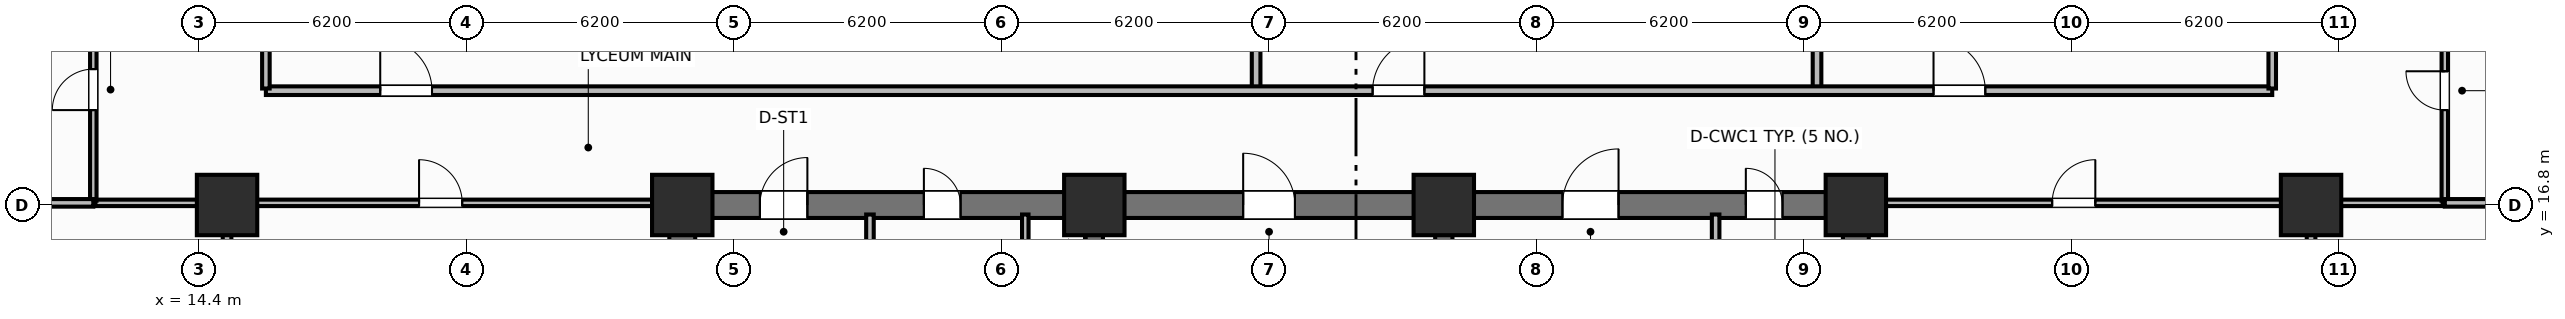
"""IFC4 building model, lengths in metres.
Left out: names, types, materials, properties, quantities, classifications, styles, units other than length and angle.
Written with IfcOpenShell. Run it as: python <this file> out.ifc"""

import sys

from ifc_helpers import new_model, si_unit, direction, frame, frame_2d, origin, origin_2d, place, context, subcontext, project, spatial, rectangle, extrude, element, fill, save


model = new_model("IFC4")
c1 = context("Model", 3, precision=1e-05, world=origin(), true_north=direction((0.0, 1.0)))
c2 = subcontext(c1, "Body", "Model", "MODEL_VIEW")
j1 = project(units=[si_unit("LENGTHUNIT", "METRE"), si_unit("PLANEANGLEUNIT", "RADIAN")], contexts=[c1])
p1 = place(None, origin())
s1 = spatial("IfcSite", under=j1, at=p1, CompositionType="ELEMENT")
p2 = place(p1, origin())
s2 = spatial("IfcBuilding", under=s1, at=p2, CompositionType="ELEMENT")
p3 = place(p2, frame((0.0, 0.0, 20.1)))
s3 = spatial("IfcBuildingStorey", under=s2, at=p3, CompositionType="ELEMENT", Elevation=20.1)
for number, where, z_axis, x_axis in (
    (1, (25.6, 10.9, 0.0), (0.0, 0.0, 1.0), (0.0, 1.0, 0.0)),
    (2, (52.8, 10.9, 0.0), (0.0, 0.0, 1.0), (0.0, 1.0, 0.0)),
):
    element("IfcWall", number, at=place(p3, frame(where, z_axis=z_axis, x_axis=x_axis)), inside=s3, PredefinedType="SHEAR", context=c2, shape_type="SweptSolid", body=[
        extrude(rectangle(XDim=5.6, YDim=0.6, at=frame_2d((2.8, 0.0))), origin(), (0.0, 0.0, 1.0), 4.5),
    ])
p4 = place(p3, frame((25.6, 16.8, 0.0), z_axis=(0.0, 0.0, 1.0), x_axis=(1.0, 0.0, 0.0)))
e3 = element("IfcWall", 3, at=p4, inside=s3, PredefinedType="SHEAR", context=c2, shape_type="SweptSolid", body=[
    extrude(rectangle(XDim=27.2, YDim=0.6, at=frame_2d((13.6, 0.0))), origin(), (0.0, 0.0, 1.0), 4.5),
])
p5 = place(p4, frame((1.8, 0.0, 0.0)))
e4 = element("IfcOpeningElement", 4, at=p5, cuts=e3, PredefinedType="OPENING", context=c2, shape_type="SweptSolid", body=[
    extrude(rectangle(XDim=1.1, YDim=2.15, at=frame_2d((0.55, 1.075))), frame((0.0, 0.31, 0.0), z_axis=(0.0, -1.0, 0.0), x_axis=(1.0, 0.0, 0.0)), (0.0, 0.0, 1.0), 0.62),
])
p6 = place(p4, frame((5.6, 0.0, 0.0)))
e5 = element("IfcOpeningElement", 5, at=p6, cuts=e3, PredefinedType="OPENING", context=c2, shape_type="SweptSolid", body=[
    extrude(rectangle(XDim=0.85, YDim=2.1, at=frame_2d((0.425, 1.05))), frame((0.0, 0.31, 0.0), z_axis=(0.0, -1.0, 0.0), x_axis=(1.0, 0.0, 0.0)), (0.0, 0.0, 1.0), 0.62),
])
p7 = place(p4, frame((13.0, 0.0, 0.0)))
e6 = element("IfcOpeningElement", 6, at=p7, cuts=e3, PredefinedType="OPENING", context=c2, shape_type="SweptSolid", body=[
    extrude(rectangle(XDim=1.2, YDim=2.15, at=frame_2d((0.6, 1.075))), frame((0.0, 0.31, 0.0), z_axis=(0.0, -1.0, 0.0), x_axis=(1.0, 0.0, 0.0)), (0.0, 0.0, 1.0), 0.62),
])
p8 = place(p4, frame((20.4, 0.0, 0.0)))
e7 = element("IfcOpeningElement", 7, at=p8, cuts=e3, PredefinedType="OPENING", context=c2, shape_type="SweptSolid", body=[
    extrude(rectangle(XDim=1.3, YDim=2.2, at=frame_2d((0.65, 1.1))), frame((0.0, 0.31, 0.0), z_axis=(0.0, -1.0, 0.0), x_axis=(1.0, 0.0, 0.0)), (0.0, 0.0, 1.0), 0.62),
])
p9 = place(p4, frame((24.65, 0.0, 0.0)))
e8 = element("IfcOpeningElement", 8, at=p9, cuts=e3, PredefinedType="OPENING", context=c2, shape_type="SweptSolid", body=[
    extrude(rectangle(XDim=0.85, YDim=2.1, at=frame_2d((0.425, 1.05))), frame((0.0, 0.31, 0.0), z_axis=(0.0, -1.0, 0.0), x_axis=(1.0, 0.0, 0.0)), (0.0, 0.0, 1.0), 0.62),
])
for number, where, z_axis, x_axis in (
    (9, (35.15, 10.9, 0.0), (0.0, 0.0, 1.0), (0.0, 1.0, 0.0)),
    (10, (43.25, 10.9, 0.0), (0.0, 0.0, 1.0), (0.0, 1.0, 0.0)),
):
    element("IfcWall", number, at=place(p3, frame(where, z_axis=z_axis, x_axis=x_axis)), inside=s3, PredefinedType="SHEAR", context=c2, shape_type="SweptSolid", body=[
        extrude(rectangle(XDim=5.6, YDim=0.4, at=frame_2d((2.8, 0.0))), origin(), (0.0, 0.0, 1.0), 4.5),
    ])
for number, where, z_axis, x_axis in (
    (11, (25.6, 16.8, 0.0), (0.0, 0.0, 1.0), (1.0, 0.0, 0.0)),
    (12, (35.15, 16.8, 0.0), (0.0, 0.0, 1.0), (1.0, 0.0, 0.0)),
    (13, (43.25, 16.8, 0.0), (0.0, 0.0, 1.0), (1.0, 0.0, 0.0)),
    (14, (52.8, 16.8, 0.0), (0.0, 0.0, 1.0), (1.0, 0.0, 0.0)),
    (15, (15.05, 16.8, 0.0), (0.0, 0.0, 1.0), (1.0, 0.0, 0.0)),
    (16, (63.35, 16.8, 0.0), (0.0, 0.0, 1.0), (1.0, 0.0, 0.0)),
):
    element("IfcColumn", number, at=place(p3, frame(where, z_axis=z_axis, x_axis=x_axis)), inside=s3, PredefinedType="COLUMN", context=c2, shape_type="SweptSolid", body=[
        extrude(rectangle(XDim=1.4, YDim=1.4, at=origin_2d()), origin(), (0.0, 0.0, 1.0), 4.5),
    ])
p10 = place(p3, frame((29.95, 14.5, 0.0), z_axis=(0.0, 0.0, 1.0), x_axis=(0.0, 1.0, 0.0)))
e17 = element("IfcWall", 17, at=p10, inside=s3, PredefinedType="PARTITIONING", context=c2, shape_type="SweptSolid", body=[
    extrude(rectangle(XDim=2.08, YDim=0.175, at=frame_2d((1.04, 0.0))), origin(), (0.0, 0.0, 1.0), 2.26),
])
p11 = place(p3, frame((33.55, 14.5, 0.0), z_axis=(0.0, 0.0, 1.0), x_axis=(0.0, 1.0, 0.0)))
e18 = element("IfcWall", 18, at=p11, inside=s3, PredefinedType="PARTITIONING", context=c2, shape_type="SweptSolid", body=[
    extrude(rectangle(XDim=2.08, YDim=0.15, at=frame_2d((1.04, 0.0))), origin(), (0.0, 0.0, 1.0), 2.26),
])
p12 = place(p11, frame((0.55, 0.0, 0.0)))
e19 = element("IfcOpeningElement", 19, at=p12, cuts=e18, PredefinedType="OPENING", context=c2, shape_type="SweptSolid", body=[
    extrude(rectangle(XDim=0.85, YDim=2.05, at=frame_2d((0.425, 1.025))), frame((0.0, 0.085, 0.0), z_axis=(0.0, -1.0, 0.0), x_axis=(1.0, 0.0, 0.0)), (0.0, 0.0, 1.0), 0.17),
])
p13 = place(p3, frame((49.55, 13.7, 0.0), z_axis=(0.0, 0.0, 1.0), x_axis=(0.0, 1.0, 0.0)))
e20 = element("IfcWall", 20, at=p13, inside=s3, PredefinedType="PARTITIONING", context=c2, shape_type="SweptSolid", body=[
    extrude(rectangle(XDim=2.88, YDim=0.175, at=frame_2d((1.44, 0.0))), origin(), (0.0, 0.0, 1.0), 2.26),
])
for number, where, z_axis, x_axis in (
    (21, (38.9, 19.5, 0.0), (0.0, 0.0, 1.0), (0.0, 1.0, 0.0)),
    (22, (51.9, 19.5, 0.0), (0.0, 0.0, 1.0), (0.0, 1.0, 0.0)),
):
    element("IfcWall", number, at=place(p3, frame(where, z_axis=z_axis, x_axis=x_axis)), inside=s3, PredefinedType="PARTITIONING", context=c2, shape_type="SweptSolid", body=[
        extrude(rectangle(XDim=17.4, YDim=0.2, at=frame_2d((8.7, 0.0))), origin(), (0.0, 0.0, 1.0), 2.26),
    ])
p14 = place(p3, frame((15.95, 19.45, 0.0), z_axis=(0.0, 0.0, 1.0), x_axis=(1.0, 0.0, 0.0)))
e23 = element("IfcWall", 23, at=p14, inside=s3, PredefinedType="PARTITIONING", context=c2, shape_type="SweptSolid", body=[
    extrude(rectangle(XDim=46.5, YDim=0.2, at=frame_2d((23.25, 0.0))), origin(), (0.0, 0.0, 1.0), 2.26),
])
p15 = place(p14, frame((2.65, 0.0, 0.0)))
e24 = element("IfcOpeningElement", 24, at=p15, cuts=e23, PredefinedType="OPENING", context=c2, shape_type="SweptSolid", body=[
    extrude(rectangle(XDim=1.2, YDim=2.15, at=frame_2d((0.6, 1.075))), frame((0.0, 0.11, 0.0), z_axis=(0.0, -1.0, 0.0), x_axis=(1.0, 0.0, 0.0)), (0.0, 0.0, 1.0), 0.22),
])
p16 = place(p14, frame((25.65, 0.0, 0.0)))
e25 = element("IfcOpeningElement", 25, at=p16, cuts=e23, PredefinedType="OPENING", context=c2, shape_type="SweptSolid", body=[
    extrude(rectangle(XDim=1.2, YDim=2.15, at=frame_2d((0.6, 1.075))), frame((0.0, 0.11, 0.0), z_axis=(0.0, -1.0, 0.0), x_axis=(1.0, 0.0, 0.0)), (0.0, 0.0, 1.0), 0.22),
])
p17 = place(p14, frame((38.65, 0.0, 0.0)))
e26 = element("IfcOpeningElement", 26, at=p17, cuts=e23, PredefinedType="OPENING", context=c2, shape_type="SweptSolid", body=[
    extrude(rectangle(XDim=1.2, YDim=2.15, at=frame_2d((0.6, 1.075))), frame((0.0, 0.11, 0.0), z_axis=(0.0, -1.0, 0.0), x_axis=(1.0, 0.0, 0.0)), (0.0, 0.0, 1.0), 0.22),
])
for number, where, z_axis, x_axis in (
    (27, (15.95, 19.5, 0.0), (0.0, 0.0, 1.0), (0.0, 1.0, 0.0)),
    (28, (62.45, 19.5, 0.0), (0.0, 0.0, 1.0), (0.0, 1.0, 0.0)),
):
    element("IfcWall", number, at=place(p3, frame(where, z_axis=z_axis, x_axis=x_axis)), inside=s3, PredefinedType="PARTITIONING", context=c2, shape_type="SweptSolid", body=[
        extrude(rectangle(XDim=17.4, YDim=0.175, at=frame_2d((8.7, 0.0))), origin(), (0.0, 0.0, 1.0), 2.26),
    ])
p18 = place(p3, frame((15.05, 0.4, 0.0), z_axis=(0.0, 0.0, 1.0), x_axis=(0.0, 1.0, 0.0)))
e29 = element("IfcWall", 29, at=p18, inside=s3, PredefinedType="PARTITIONING", context=c2, shape_type="SweptSolid", body=[
    extrude(rectangle(XDim=16.4, YDim=0.2, at=frame_2d((8.2, 0.0))), origin(), (0.0, 0.0, 1.0), 2.26),
])
p19 = place(p18, frame((5.5, 0.0, 0.0)))
e30 = element("IfcOpeningElement", 30, at=p19, cuts=e29, PredefinedType="OPENING", context=c2, shape_type="SweptSolid", body=[
    extrude(rectangle(XDim=1.0, YDim=2.15, at=frame_2d((0.5, 1.075))), frame((0.0, 0.11, 0.0), z_axis=(0.0, -1.0, 0.0), x_axis=(1.0, 0.0, 0.0)), (0.0, 0.0, 1.0), 0.22),
])
p20 = place(p3, frame((12.0, 16.85, 0.0), z_axis=(0.0, 0.0, 1.0), x_axis=(1.0, 0.0, 0.0)))
e31 = element("IfcWall", 31, at=p20, inside=s3, PredefinedType="PARTITIONING", context=c2, shape_type="SweptSolid", body=[
    extrude(rectangle(XDim=13.25, YDim=0.15, at=frame_2d((6.625, 0.0))), origin(), (0.0, 0.0, 1.0), 2.26),
])
p21 = place(p20, frame((7.5, 0.0, 0.0)))
e32 = element("IfcOpeningElement", 32, at=p21, cuts=e31, PredefinedType="OPENING", context=c2, shape_type="SweptSolid", body=[
    extrude(rectangle(XDim=1.0, YDim=2.15, at=frame_2d((0.5, 1.075))), frame((0.0, 0.085, 0.0), z_axis=(0.0, -1.0, 0.0), x_axis=(1.0, 0.0, 0.0)), (0.0, 0.0, 1.0), 0.17),
])
p22 = place(p3, frame((11.95, 16.9, 0.0), z_axis=(0.0, 0.0, 1.0), x_axis=(0.0, 1.0, 0.0)))
e33 = element("IfcWall", 33, at=p22, inside=s3, PredefinedType="PARTITIONING", context=c2, shape_type="SweptSolid", body=[
    extrude(rectangle(XDim=5.65, YDim=0.15, at=frame_2d((2.825, 0.0))), origin(), (0.0, 0.0, 1.0), 2.26),
])
p23 = place(p22, frame((2.1, 0.0, 0.0)))
e34 = element("IfcOpeningElement", 34, at=p23, cuts=e33, PredefinedType="OPENING", context=c2, shape_type="SweptSolid", body=[
    extrude(rectangle(XDim=0.95, YDim=2.1, at=frame_2d((0.475, 1.05))), frame((0.0, 0.085, 0.0), z_axis=(0.0, -1.0, 0.0), x_axis=(1.0, 0.0, 0.0)), (0.0, 0.0, 1.0), 0.17),
])
p24 = place(p3, frame((0.4, 16.85, 0.0), z_axis=(0.0, 0.0, 1.0), x_axis=(1.0, 0.0, 0.0)))
e35 = element("IfcWall", 35, at=p24, inside=s3, PredefinedType="PARTITIONING", context=c2, shape_type="SweptSolid", body=[
    extrude(rectangle(XDim=11.55, YDim=0.175, at=frame_2d((5.775, 0.0))), origin(), (0.0, 0.0, 1.0), 2.26),
])
p25 = place(p3, frame((63.35, 0.4, 0.0), z_axis=(0.0, 0.0, 1.0), x_axis=(0.0, 1.0, 0.0)))
e36 = element("IfcWall", 36, at=p25, inside=s3, PredefinedType="PARTITIONING", context=c2, shape_type="SweptSolid", body=[
    extrude(rectangle(XDim=16.4, YDim=0.2, at=frame_2d((8.2, 0.0))), origin(), (0.0, 0.0, 1.0), 2.26),
])
p26 = place(p25, frame((5.5, 0.0, 0.0)))
e37 = element("IfcOpeningElement", 37, at=p26, cuts=e36, PredefinedType="OPENING", context=c2, shape_type="SweptSolid", body=[
    extrude(rectangle(XDim=1.0, YDim=2.15, at=frame_2d((0.5, 1.075))), frame((0.0, 0.11, 0.0), z_axis=(0.0, -1.0, 0.0), x_axis=(1.0, 0.0, 0.0)), (0.0, 0.0, 1.0), 0.22),
])
p27 = place(p3, frame((53.15, 16.85, 0.0), z_axis=(0.0, 0.0, 1.0), x_axis=(1.0, 0.0, 0.0)))
e38 = element("IfcWall", 38, at=p27, inside=s3, PredefinedType="PARTITIONING", context=c2, shape_type="SweptSolid", body=[
    extrude(rectangle(XDim=13.25, YDim=0.15, at=frame_2d((6.625, 0.0))), origin(), (0.0, 0.0, 1.0), 2.26),
])
p28 = place(p27, frame((4.2, 0.0, 0.0)))
e39 = element("IfcOpeningElement", 39, at=p28, cuts=e38, PredefinedType="OPENING", context=c2, shape_type="SweptSolid", body=[
    extrude(rectangle(XDim=1.0, YDim=2.15, at=frame_2d((0.5, 1.075))), frame((0.0, 0.085, 0.0), z_axis=(0.0, -1.0, 0.0), x_axis=(1.0, 0.0, 0.0)), (0.0, 0.0, 1.0), 0.17),
])
p29 = place(p3, frame((66.45, 16.9, 0.0), z_axis=(0.0, 0.0, 1.0), x_axis=(0.0, 1.0, 0.0)))
e40 = element("IfcWall", 40, at=p29, inside=s3, PredefinedType="PARTITIONING", context=c2, shape_type="SweptSolid", body=[
    extrude(rectangle(XDim=5.65, YDim=0.15, at=frame_2d((2.825, 0.0))), origin(), (0.0, 0.0, 1.0), 2.26),
])
p30 = place(p29, frame((2.1, 0.0, 0.0)))
e41 = element("IfcOpeningElement", 41, at=p30, cuts=e40, PredefinedType="OPENING", context=c2, shape_type="SweptSolid", body=[
    extrude(rectangle(XDim=0.9, YDim=2.1, at=frame_2d((0.45, 1.05))), frame((0.0, 0.085, 0.0), z_axis=(0.0, -1.0, 0.0), x_axis=(1.0, 0.0, 0.0)), (0.0, 0.0, 1.0), 0.17),
])
p31 = place(p3, frame((66.45, 16.85, 0.0), z_axis=(0.0, 0.0, 1.0), x_axis=(1.0, 0.0, 0.0)))
e42 = element("IfcWall", 42, at=p31, inside=s3, PredefinedType="PARTITIONING", context=c2, shape_type="SweptSolid", body=[
    extrude(rectangle(XDim=11.55, YDim=0.175, at=frame_2d((5.775, 0.0))), origin(), (0.0, 0.0, 1.0), 2.26),
])
p32 = place(p15, origin())
e43 = element("IfcDoor", 43, at=p32, inside=s3, OperationType="SINGLE_SWING_LEFT", PredefinedType="DOOR", context=c2, shape_type="SweptSolid", body=[
    extrude(rectangle(XDim=1.2, YDim=2.15, at=frame_2d((0.6, 1.075))), frame((0.0, 0.025, 0.0), z_axis=(0.0, -1.0, 0.0), x_axis=(1.0, 0.0, 0.0)), (0.0, 0.0, 1.0), 0.05),
])
fill(e24, e43)
p33 = place(p16, origin())
e44 = element("IfcDoor", 44, at=p33, inside=s3, OperationType="SINGLE_SWING_RIGHT", PredefinedType="DOOR", context=c2, shape_type="SweptSolid", body=[
    extrude(rectangle(XDim=1.2, YDim=2.15, at=frame_2d((0.6, 1.075))), frame((0.0, 0.025, 0.0), z_axis=(0.0, -1.0, 0.0), x_axis=(1.0, 0.0, 0.0)), (0.0, 0.0, 1.0), 0.05),
])
fill(e25, e44)
p34 = place(p17, origin())
e45 = element("IfcDoor", 45, at=p34, inside=s3, OperationType="SINGLE_SWING_LEFT", PredefinedType="DOOR", context=c2, shape_type="SweptSolid", body=[
    extrude(rectangle(XDim=1.2, YDim=2.15, at=frame_2d((0.6, 1.075))), frame((0.0, 0.025, 0.0), z_axis=(0.0, -1.0, 0.0), x_axis=(1.0, 0.0, 0.0)), (0.0, 0.0, 1.0), 0.05),
])
fill(e26, e45)
p35 = place(p21, origin())
e46 = element("IfcDoor", 46, at=p35, inside=s3, OperationType="SINGLE_SWING_LEFT", PredefinedType="DOOR", context=c2, shape_type="SweptSolid", body=[
    extrude(rectangle(XDim=1.0, YDim=2.15, at=frame_2d((0.5, 1.075))), frame((0.0, 0.025, 0.0), z_axis=(0.0, -1.0, 0.0), x_axis=(1.0, 0.0, 0.0)), (0.0, 0.0, 1.0), 0.05),
])
fill(e32, e46)
p36 = place(p23, origin())
e47 = element("IfcDoor", 47, at=p36, inside=s3, OperationType="SINGLE_SWING_LEFT", PredefinedType="DOOR", context=c2, shape_type="SweptSolid", body=[
    extrude(rectangle(XDim=0.95, YDim=2.1, at=frame_2d((0.475, 1.05))), frame((0.0, 0.025, 0.0), z_axis=(0.0, -1.0, 0.0), x_axis=(1.0, 0.0, 0.0)), (0.0, 0.0, 1.0), 0.05),
])
fill(e34, e47)
p37 = place(p28, origin())
e48 = element("IfcDoor", 48, at=p37, inside=s3, OperationType="SINGLE_SWING_RIGHT", PredefinedType="DOOR", context=c2, shape_type="SweptSolid", body=[
    extrude(rectangle(XDim=1.0, YDim=2.15, at=frame_2d((0.5, 1.075))), frame((0.0, 0.025, 0.0), z_axis=(0.0, -1.0, 0.0), x_axis=(1.0, 0.0, 0.0)), (0.0, 0.0, 1.0), 0.05),
])
fill(e39, e48)
p38 = place(p30, origin())
e49 = element("IfcDoor", 49, at=p38, inside=s3, OperationType="SINGLE_SWING_RIGHT", PredefinedType="DOOR", context=c2, shape_type="SweptSolid", body=[
    extrude(rectangle(XDim=0.9, YDim=2.1, at=frame_2d((0.45, 1.05))), frame((0.0, 0.025, 0.0), z_axis=(0.0, -1.0, 0.0), x_axis=(1.0, 0.0, 0.0)), (0.0, 0.0, 1.0), 0.05),
])
fill(e41, e49)
p39 = place(p5, origin())
e50 = element("IfcDoor", 50, at=p39, inside=s3, OperationType="SINGLE_SWING_RIGHT", PredefinedType="DOOR", context=c2, shape_type="SweptSolid", body=[
    extrude(rectangle(XDim=1.1, YDim=2.15, at=frame_2d((0.55, 1.075))), frame((0.0, 0.025, 0.0), z_axis=(0.0, -1.0, 0.0), x_axis=(1.0, 0.0, 0.0)), (0.0, 0.0, 1.0), 0.05),
])
fill(e4, e50)
p40 = place(p6, origin())
e51 = element("IfcDoor", 51, at=p40, inside=s3, OperationType="SINGLE_SWING_LEFT", PredefinedType="DOOR", context=c2, shape_type="SweptSolid", body=[
    extrude(rectangle(XDim=0.85, YDim=2.1, at=frame_2d((0.425, 1.05))), frame((0.0, 0.025, 0.0), z_axis=(0.0, -1.0, 0.0), x_axis=(1.0, 0.0, 0.0)), (0.0, 0.0, 1.0), 0.05),
])
fill(e5, e51)
p41 = place(p7, origin())
e52 = element("IfcDoor", 52, at=p41, inside=s3, OperationType="SINGLE_SWING_LEFT", PredefinedType="DOOR", context=c2, shape_type="SweptSolid", body=[
    extrude(rectangle(XDim=1.2, YDim=2.15, at=frame_2d((0.6, 1.075))), frame((0.0, 0.025, 0.0), z_axis=(0.0, -1.0, 0.0), x_axis=(1.0, 0.0, 0.0)), (0.0, 0.0, 1.0), 0.05),
])
fill(e6, e52)
p42 = place(p8, origin())
e53 = element("IfcDoor", 53, at=p42, inside=s3, OperationType="SINGLE_SWING_RIGHT", PredefinedType="DOOR", context=c2, shape_type="SweptSolid", body=[
    extrude(rectangle(XDim=1.3, YDim=2.2, at=frame_2d((0.65, 1.1))), frame((0.0, 0.025, 0.0), z_axis=(0.0, -1.0, 0.0), x_axis=(1.0, 0.0, 0.0)), (0.0, 0.0, 1.0), 0.05),
])
fill(e7, e53)
p43 = place(p9, origin())
e54 = element("IfcDoor", 54, at=p43, inside=s3, OperationType="SINGLE_SWING_LEFT", PredefinedType="DOOR", context=c2, shape_type="SweptSolid", body=[
    extrude(rectangle(XDim=0.85, YDim=2.1, at=frame_2d((0.425, 1.05))), frame((0.0, 0.025, 0.0), z_axis=(0.0, -1.0, 0.0), x_axis=(1.0, 0.0, 0.0)), (0.0, 0.0, 1.0), 0.05),
])
fill(e8, e54)
save(model, sys.argv[1])
